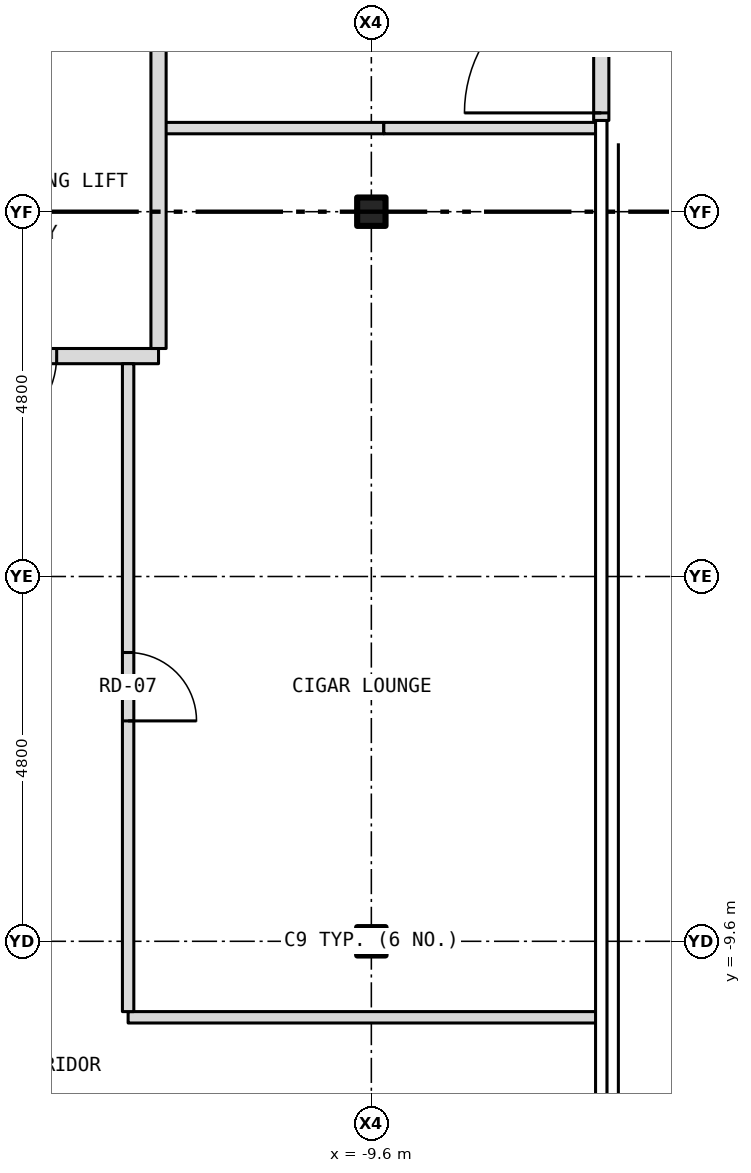
"""IFC4 building model, lengths in metres.
Left out: names, types, materials, properties, quantities, classifications, styles, units other than length and angle.
Written with IfcOpenShell. Run it as: python <this file> out.ifc"""

import sys

from ifc_helpers import new_model, si_unit, direction, frame, frame_2d, origin, origin_2d, place, context, subcontext, project, spatial, rectangle, i_section, extrude, element, fill, save


model = new_model("IFC4")
c1 = context("Model", 3, precision=1e-05, world=origin(), true_north=direction((0.0, 1.0)))
c2 = subcontext(c1, "Body", "Model", "MODEL_VIEW")
j1 = project(units=[si_unit("LENGTHUNIT", "METRE"), si_unit("PLANEANGLEUNIT", "RADIAN")], contexts=[c1])
p1 = place(None, origin())
s1 = spatial("IfcSite", under=j1, at=p1, CompositionType="ELEMENT")
p2 = place(p1, origin())
s2 = spatial("IfcBuilding", under=s1, at=p2, CompositionType="ELEMENT")
p3 = place(p2, frame((0.0, 0.0, 219.0)))
s3 = spatial("IfcBuildingStorey", under=s2, at=p3, CompositionType="ELEMENT", Elevation=219.0)
for number, where, z_axis, x_axis in (
    (1, (-9.6, -9.6, -0.15), (0.0, 0.0, 1.0), (1.0, 0.0, 0.0)),
    (2, (-9.6, 0.0, -0.15), (0.0, 0.0, 1.0), (1.0, 0.0, 0.0)),
):
    element("IfcColumn", number, at=place(p3, frame(where, z_axis=z_axis, x_axis=x_axis)), inside=s3, PredefinedType="COLUMN", context=c2, shape_type="SweptSolid", body=[
        extrude(i_section(OverallWidth=0.373, OverallDepth=0.373, WebThickness=0.016, FlangeThickness=0.026, at=origin_2d()), origin(), (0.0, 0.0, 1.0), 3.5),
    ])
p4 = place(p3, frame((-6.575, 1.2, 0.0), z_axis=(0.0, 0.0, 1.0), x_axis=(0.0, 1.0, 0.0)))
e3 = element("IfcWall", 3, at=p4, inside=s3, PredefinedType="SOLIDWALL", context=c2, shape_type="SweptSolid", body=[
    extrude(rectangle(XDim=2.0, YDim=0.2, at=frame_2d((1.0, 0.0))), origin(), (0.0, 0.0, 1.0), 2.593),
])
p5 = place(p4, frame((0.1, 0.0, 0.0)))
e4 = element("IfcOpeningElement", 4, at=p5, cuts=e3, PredefinedType="OPENING", context=c2, shape_type="SweptSolid", body=[
    extrude(rectangle(XDim=1.8, YDim=2.1, at=frame_2d((0.9, 1.05))), frame((0.0, 0.112, 0.0), z_axis=(0.0, -1.0, 0.0), x_axis=(1.0, 0.0, 0.0)), (0.0, 0.0, 1.0), 0.224),
])
p6 = place(p3, frame((-12.8, -10.6, 0.0), z_axis=(0.0, 0.0, 1.0), x_axis=(1.0, 0.0, 0.0)))
e5 = element("IfcWall", 5, at=p6, inside=s3, PredefinedType="PARTITIONING", context=c2, shape_type="SweptSolid", body=[
    extrude(rectangle(XDim=6.18, YDim=0.15, at=frame_2d((3.09, 0.0))), origin(), (0.0, 0.0, 1.0), 3.35),
])
p7 = place(p3, frame((-15.68, -1.9, 0.0), z_axis=(0.0, 0.0, 1.0), x_axis=(1.0, 0.0, 0.0)))
e6 = element("IfcWall", 6, at=p7, inside=s3, PredefinedType="PARTITIONING", context=c2, shape_type="SweptSolid", body=[
    extrude(rectangle(XDim=3.28, YDim=0.2, at=frame_2d((1.64, 0.0))), origin(), (0.0, 0.0, 1.0), 3.35),
])
p8 = place(p7, frame((0.84, 0.0, 0.0)))
e7 = element("IfcOpeningElement", 7, at=p8, cuts=e6, PredefinedType="OPENING", context=c2, shape_type="SweptSolid", body=[
    extrude(rectangle(XDim=1.1, YDim=2.1, at=frame_2d((0.55, 1.05))), frame((0.0, 0.112, 0.0), z_axis=(0.0, -1.0, 0.0), x_axis=(1.0, 0.0, 0.0)), (0.0, 0.0, 1.0), 0.224),
])
p9 = place(p3, frame((-12.4, 1.1, 0.0), z_axis=(0.0, 0.0, 1.0), x_axis=(1.0, 0.0, 0.0)))
e8 = element("IfcWall", 8, at=p9, inside=s3, PredefinedType="PARTITIONING", context=c2, shape_type="SweptSolid", body=[
    extrude(rectangle(XDim=2.964, YDim=0.15, at=frame_2d((1.482, 0.0))), origin(), (0.0, 0.0, 1.0), 3.35),
])
p10 = place(p3, frame((-9.436, 1.1, 0.0), z_axis=(0.0, 0.0, 1.0), x_axis=(1.0, 0.0, 0.0)))
e9 = element("IfcWall", 9, at=p10, inside=s3, PredefinedType="PARTITIONING", context=c2, shape_type="SweptSolid", body=[
    extrude(rectangle(XDim=2.816, YDim=0.15, at=frame_2d((1.408, 0.0))), origin(), (0.0, 0.0, 1.0), 2.593),
])
p11 = place(p3, frame((-12.8, -10.525, 0.0), z_axis=(0.0, 0.0, 1.0), x_axis=(0.0, 1.0, 0.0)))
e10 = element("IfcWall", 10, at=p11, inside=s3, PredefinedType="PARTITIONING", context=c2, shape_type="SweptSolid", body=[
    extrude(rectangle(XDim=8.525, YDim=0.15, at=frame_2d((4.262, 0.0))), origin(), (0.0, 0.0, 1.0), 3.35),
])
p12 = place(p11, frame((3.825, 0.0, 0.0)))
e11 = element("IfcOpeningElement", 11, at=p12, cuts=e10, PredefinedType="OPENING", context=c2, shape_type="SweptSolid", body=[
    extrude(rectangle(XDim=0.9, YDim=2.1, at=frame_2d((0.45, 1.05))), frame((0.0, 0.087, 0.0), z_axis=(0.0, -1.0, 0.0), x_axis=(1.0, 0.0, 0.0)), (0.0, 0.0, 1.0), 0.174),
])
p13 = place(p3, frame((-12.4, -1.8, 0.0), z_axis=(0.0, 0.0, 1.0), x_axis=(0.0, 1.0, 0.0)))
e12 = element("IfcWall", 12, at=p13, inside=s3, PredefinedType="PARTITIONING", context=c2, shape_type="SweptSolid", body=[
    extrude(rectangle(XDim=4.0, YDim=0.2, at=frame_2d((2.0, 0.0))), origin(), (0.0, 0.0, 1.0), 3.35),
])
p14 = place(p5, origin())
e13 = element("IfcDoor", 13, at=p14, inside=s3, OperationType="DOUBLE_DOOR_DOUBLE_SWING", PredefinedType="DOOR", context=c2, shape_type="SweptSolid", body=[
    extrude(rectangle(XDim=1.8, YDim=2.1, at=frame_2d((0.9, 1.05))), frame((0.0, 0.025, 0.0), z_axis=(0.0, -1.0, 0.0), x_axis=(1.0, 0.0, 0.0)), (0.0, 0.0, 1.0), 0.05),
])
fill(e4, e13)
p15 = place(p8, origin())
e14 = element("IfcDoor", 14, at=p15, inside=s3, OperationType="SINGLE_SWING_LEFT", PredefinedType="DOOR", context=c2, shape_type="SweptSolid", body=[
    extrude(rectangle(XDim=1.1, YDim=2.1, at=frame_2d((0.55, 1.05))), frame((0.0, 0.025, 0.0), z_axis=(0.0, -1.0, 0.0), x_axis=(1.0, 0.0, 0.0)), (0.0, 0.0, 1.0), 0.05),
])
fill(e7, e14)
p16 = place(p12, origin())
e15 = element("IfcDoor", 15, at=p16, inside=s3, OperationType="SINGLE_SWING_LEFT", PredefinedType="DOOR", context=c2, shape_type="SweptSolid", body=[
    extrude(rectangle(XDim=0.9, YDim=2.1, at=frame_2d((0.45, 1.05))), frame((0.0, 0.025, 0.0), z_axis=(0.0, -1.0, 0.0), x_axis=(1.0, 0.0, 0.0)), (0.0, 0.0, 1.0), 0.05),
])
fill(e11, e15)
save(model, sys.argv[1])
